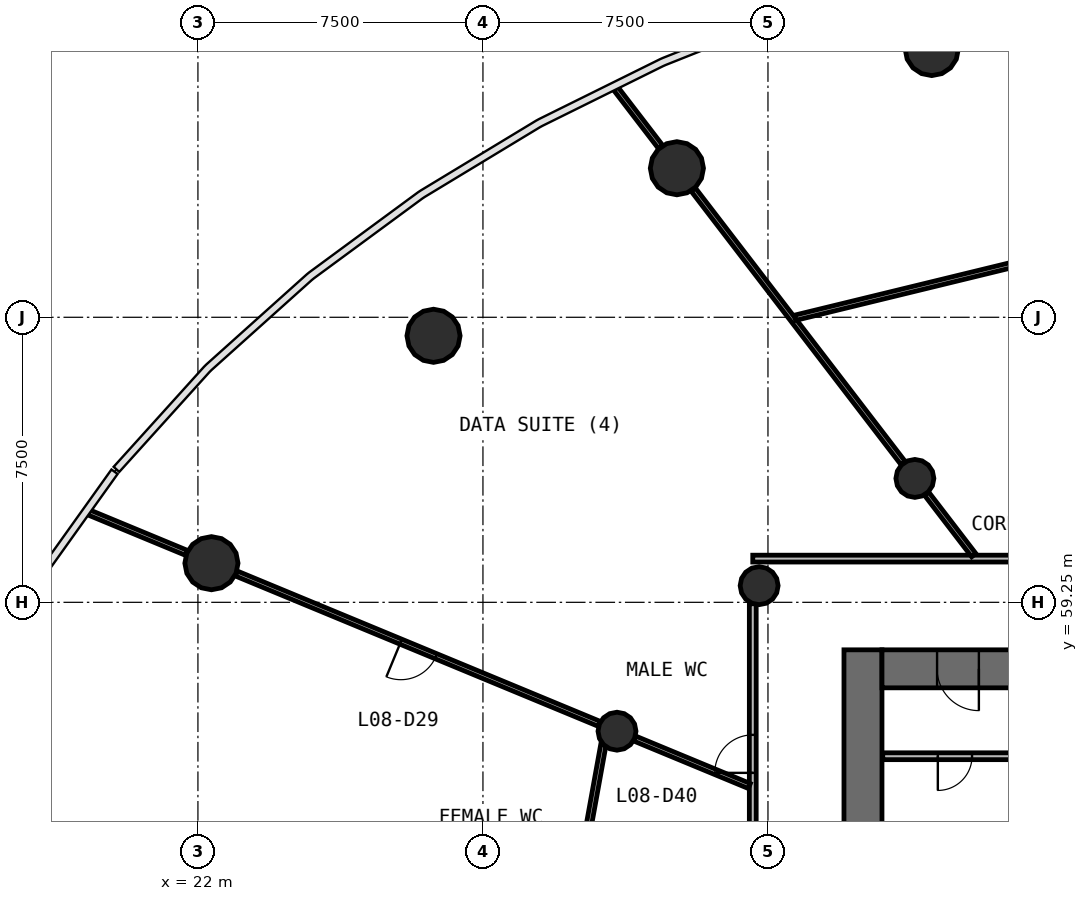
"""IFC4 building model, lengths in metres.
Left out: names, types, materials, properties, quantities, classifications, styles, units other than length and angle.
Written with IfcOpenShell. Run it as: python <this file> out.ifc"""

import sys

from ifc_helpers import new_model, si_unit, direction, frame, frame_2d, origin, origin_2d, place, context, subcontext, project, spatial, rectangle, circle, extrude, source, transform, mapped, element, fill, save


model = new_model("IFC4")
c1 = context("Model", 3, precision=1e-05, world=origin(), true_north=direction((0.0, 1.0)))
c2 = subcontext(c1, "Body", "Model", "MODEL_VIEW")
j1 = project(units=[si_unit("LENGTHUNIT", "METRE"), si_unit("PLANEANGLEUNIT", "RADIAN")], contexts=[c1])
p1 = place(None, origin())
s1 = spatial("IfcSite", under=j1, at=p1, CompositionType="ELEMENT")
p2 = place(p1, origin())
s2 = spatial("IfcBuilding", under=s1, at=p2, CompositionType="ELEMENT")
p3 = place(p2, frame((0.0, 0.0, 35.8)))
s3 = spatial("IfcBuildingStorey", under=s2, at=p3, CompositionType="ELEMENT", Elevation=35.8)
p4 = place(p3, frame((39.5, 58.0, 0.0), z_axis=(0.0, 0.0, 1.0), x_axis=(0.0, -1.0, 0.0)))
e1 = element("IfcWall", 1, at=p4, inside=s3, PredefinedType="SHEAR", context=c2, shape_type="SweptSolid", body=[
    extrude(rectangle(XDim=20.0, YDim=1.0, at=frame_2d((10.0, 0.0))), origin(), (0.0, 0.0, 1.0), 4.4),
])
p5 = place(p4, frame((9.1, 0.0, 0.0)))
e2 = element("IfcOpeningElement", 2, at=p5, cuts=e1, PredefinedType="OPENING", context=c2, shape_type="SweptSolid", body=[
    extrude(rectangle(XDim=1.8, YDim=2.1, at=frame_2d((0.9, 1.05))), frame((0.0, 0.51, 0.0), z_axis=(0.0, -1.0, 0.0), x_axis=(1.0, 0.0, 0.0)), (0.0, 0.0, 1.0), 1.02),
])
p6 = place(p3, frame((64.0, 57.5, 0.0), z_axis=(0.0, 0.0, 1.0), x_axis=(-1.0, 0.0, 0.0)))
e3 = element("IfcWall", 3, at=p6, inside=s3, PredefinedType="SHEAR", context=c2, shape_type="SweptSolid", body=[
    extrude(rectangle(XDim=24.0, YDim=1.0, at=frame_2d((12.0, 0.0))), origin(), (0.0, 0.0, 1.0), 4.4),
])
p7 = place(p6, frame((21.45, 0.0, 0.0)))
e4 = element("IfcOpeningElement", 4, at=p7, cuts=e3, PredefinedType="OPENING", context=c2, shape_type="SweptSolid", body=[
    extrude(rectangle(XDim=1.1, YDim=2.1, at=frame_2d((0.55, 1.05))), frame((0.0, 0.51, 0.0), z_axis=(0.0, -1.0, 0.0), x_axis=(1.0, 0.0, 0.0)), (0.0, 0.0, 1.0), 1.02),
])
p8 = place(p6, frame((1.95, 0.0, 0.0)))
e5 = element("IfcOpeningElement", 5, at=p8, cuts=e3, PredefinedType="OPENING", context=c2, shape_type="SweptSolid", body=[
    extrude(rectangle(XDim=1.1, YDim=2.1, at=frame_2d((0.55, 1.05))), frame((0.0, 0.51, 0.0), z_axis=(0.0, -1.0, 0.0), x_axis=(1.0, 0.0, 0.0)), (0.0, 0.0, 1.0), 1.02),
])
m1 = source(origin(), c2, "Body", "SweptSolid", [
    extrude(circle(Radius=0.7, at=origin_2d()), origin(), (0.0, 0.0, 1.0), 4.4),
])
for number, where, z_axis, x_axis in (
    (6, (41.31, 73.809, 0.0), (0.0, 0.0, 1.0), (1.0, 0.0, 0.0)),
    (7, (34.604, 70.672, 0.0), (0.0, 0.0, 1.0), (1.0, 0.0, 0.0)),
    (8, (28.199, 66.263, 0.0), (0.0, 0.0, 1.0), (1.0, 0.0, 0.0)),
    (9, (22.355, 60.279, 0.0), (0.0, 0.0, 1.0), (1.0, 0.0, 0.0)),
):
    element("IfcColumn", number, at=place(p3, frame(where, z_axis=z_axis, x_axis=x_axis)), inside=s3, PredefinedType="COLUMN", context=c2, shape_type="MappedRepresentation", body=[
        mapped(m1, transform((0.0, 0.0, 0.0), scale=1.0)),
    ])
m2 = source(origin(), c2, "Body", "SweptSolid", [
    extrude(circle(Radius=0.5, at=origin_2d()), origin(), (0.0, 0.0, 1.0), 4.4),
])
for number, where, z_axis, x_axis in (
    (10, (40.866, 62.51, 0.0), (0.0, 0.0, 1.0), (1.0, 0.0, 0.0)),
    (11, (36.768, 59.688, 0.0), (0.0, 0.0, 1.0), (1.0, 0.0, 0.0)),
    (12, (33.028, 55.859, 0.0), (0.0, 0.0, 1.0), (1.0, 0.0, 0.0)),
):
    element("IfcColumn", number, at=place(p3, frame(where, z_axis=z_axis, x_axis=x_axis)), inside=s3, PredefinedType="COLUMN", context=c2, shape_type="MappedRepresentation", body=[
        mapped(m2, transform((0.0, 0.0, 0.0), scale=1.0)),
    ])
p9 = place(p3, frame((36.6, 60.4, 0.0), z_axis=(0.0, 0.0, 1.0), x_axis=(1.0, 0.0, 0.0)))
e13 = element("IfcWall", 13, at=p9, inside=s3, PredefinedType="PARTITIONING", context=c2, shape_type="SweptSolid", body=[
    extrude(rectangle(XDim=30.8, YDim=0.18, at=frame_2d((15.4, 0.0))), origin(), (0.0, 0.0, 1.0), 3.05),
])
p10 = place(p9, frame((20.95, 0.0, 0.0)))
e14 = element("IfcOpeningElement", 14, at=p10, cuts=e13, PredefinedType="OPENING", context=c2, shape_type="SweptSolid", body=[
    extrude(rectangle(XDim=1.0, YDim=2.1, at=frame_2d((0.5, 1.05))), frame((0.0, 0.1, 0.0), z_axis=(0.0, -1.0, 0.0), x_axis=(1.0, 0.0, 0.0)), (0.0, 0.0, 1.0), 0.2),
])
p11 = place(p9, frame((14.95, 0.0, 0.0)))
e15 = element("IfcOpeningElement", 15, at=p11, cuts=e13, PredefinedType="OPENING", context=c2, shape_type="SweptSolid", body=[
    extrude(rectangle(XDim=1.0, YDim=2.1, at=frame_2d((0.5, 1.05))), frame((0.0, 0.1, 0.0), z_axis=(0.0, -1.0, 0.0), x_axis=(1.0, 0.0, 0.0)), (0.0, 0.0, 1.0), 0.2),
])
p12 = place(p3, frame((36.6, 35.63, 0.0), z_axis=(0.0, 0.0, 1.0), x_axis=(0.0, 1.0, 0.0)))
e16 = element("IfcWall", 16, at=p12, inside=s3, PredefinedType="PARTITIONING", context=c2, shape_type="SweptSolid", body=[
    extrude(rectangle(XDim=23.583, YDim=0.18, at=frame_2d((11.791, 0.0))), origin(), (0.0, 0.0, 1.0), 3.05),
])
p13 = place(p12, frame((16.032, 0.0, 0.0)))
e17 = element("IfcOpeningElement", 17, at=p13, cuts=e16, PredefinedType="OPENING", context=c2, shape_type="SweptSolid", body=[
    extrude(rectangle(XDim=0.9, YDim=2.1, at=frame_2d((0.45, 1.05))), frame((0.0, 0.1, 0.0), z_axis=(0.0, -1.0, 0.0), x_axis=(1.0, 0.0, 0.0)), (0.0, 0.0, 1.0), 0.2),
])
p14 = place(p12, frame((13.232, 0.0, 0.0)))
e18 = element("IfcOpeningElement", 18, at=p14, cuts=e16, PredefinedType="OPENING", context=c2, shape_type="SweptSolid", body=[
    extrude(rectangle(XDim=0.9, YDim=2.1, at=frame_2d((0.45, 1.05))), frame((0.0, 0.1, 0.0), z_axis=(0.0, -1.0, 0.0), x_axis=(1.0, 0.0, 0.0)), (0.0, 0.0, 1.0), 0.2),
])
p15 = place(p12, frame((11.433, 0.0, 0.0)))
e19 = element("IfcOpeningElement", 19, at=p15, cuts=e16, PredefinedType="OPENING", context=c2, shape_type="SweptSolid", body=[
    extrude(rectangle(XDim=0.9, YDim=2.1, at=frame_2d((0.45, 1.05))), frame((0.0, 0.1, 0.0), z_axis=(0.0, -1.0, 0.0), x_axis=(1.0, 0.0, 0.0)), (0.0, 0.0, 1.0), 0.2),
])
p16 = place(p12, frame((9.133, 0.0, 0.0)))
e20 = element("IfcOpeningElement", 20, at=p16, cuts=e16, PredefinedType="OPENING", context=c2, shape_type="SweptSolid", body=[
    extrude(rectangle(XDim=1.0, YDim=2.1, at=frame_2d((0.5, 1.05))), frame((0.0, 0.1, 0.0), z_axis=(0.0, -1.0, 0.0), x_axis=(1.0, 0.0, 0.0)), (0.0, 0.0, 1.0), 0.2),
])
p17 = place(p12, frame((19.133, 0.0, 0.0)))
e21 = element("IfcOpeningElement", 21, at=p17, cuts=e16, PredefinedType="OPENING", context=c2, shape_type="SweptSolid", body=[
    extrude(rectangle(XDim=1.0, YDim=2.1, at=frame_2d((0.5, 1.05))), frame((0.0, 0.1, 0.0), z_axis=(0.0, -1.0, 0.0), x_axis=(1.0, 0.0, 0.0)), (0.0, 0.0, 1.0), 0.2),
])
p18 = place(p3, frame((43.77, 55.2, 0.0), z_axis=(0.0, 0.0, 1.0), x_axis=(-1.0, 0.0, 0.0)))
e22 = element("IfcWall", 22, at=p18, inside=s3, PredefinedType="PARTITIONING", context=c2, shape_type="SweptSolid", body=[
    extrude(rectangle(XDim=3.75, YDim=0.18, at=frame_2d((1.875, 0.0))), origin(), (0.0, 0.0, 1.0), 3.95),
])
p19 = place(p18, frame((1.4, 0.0, 0.0)))
e23 = element("IfcOpeningElement", 23, at=p19, cuts=e22, PredefinedType="OPENING", context=c2, shape_type="SweptSolid", body=[
    extrude(rectangle(XDim=0.9, YDim=2.1, at=frame_2d((0.45, 1.05))), frame((0.0, 0.1, 0.0), z_axis=(0.0, -1.0, 0.0), x_axis=(1.0, 0.0, 0.0)), (0.0, 0.0, 1.0), 0.2),
])
p20 = place(p3, frame((32.561, 56.052, 0.0), z_axis=(0.0, 0.0, 1.0), x_axis=(-0.923874685699, 0.382695133396, 0.0)))
e24 = element("IfcWall", 24, at=p20, inside=s3, PredefinedType="PARTITIONING", context=c2, shape_type="SweptSolid", body=[
    extrude(rectangle(XDim=10.341, YDim=0.14, at=frame_2d((5.17, 0.0))), origin(), (0.0, 0.0, 1.0), 3.05),
])
p21 = place(p20, frame((4.65, 0.0, 0.0)))
e25 = element("IfcOpeningElement", 25, at=p21, cuts=e24, PredefinedType="OPENING", context=c2, shape_type="SweptSolid", body=[
    extrude(rectangle(XDim=1.0, YDim=2.1, at=frame_2d((0.5, 1.05))), frame((0.0, 0.08, 0.0), z_axis=(0.0, -1.0, 0.0), x_axis=(1.0, 0.0, 0.0)), (0.0, 0.0, 1.0), 0.16),
])
p22 = place(p3, frame((35.032, 70.113, 0.0), z_axis=(0.0, 0.0, 1.0), x_axis=(0.608770769454, -0.793346173028, 0.0)))
e26 = element("IfcWall", 26, at=p22, inside=s3, PredefinedType="PARTITIONING", context=c2, shape_type="SweptSolid", body=[
    extrude(rectangle(XDim=9.079, YDim=0.14, at=frame_2d((4.54, 0.0))), origin(), (0.0, 0.0, 1.0), 3.05),
])
p23 = place(p3, frame((43.641, 68.18, 0.0), z_axis=(0.0, 0.0, 1.0), x_axis=(-0.971620655009, -0.23654450482, 0.0)))
e27 = element("IfcWall", 27, at=p23, inside=s3, PredefinedType="PARTITIONING", context=c2, shape_type="SweptSolid", body=[
    extrude(rectangle(XDim=6.103, YDim=0.14, at=frame_2d((3.051, 0.0))), origin(), (0.0, 0.0, 1.0), 3.05),
])
p24 = place(p3, frame((32.669, 55.503, 0.0), z_axis=(0.0, 0.0, 1.0), x_axis=(-0.178046403734, -0.984022092291, 0.0)))
e28 = element("IfcWall", 28, at=p24, inside=s3, PredefinedType="PARTITIONING", context=c2, shape_type="SweptSolid", body=[
    extrude(rectangle(XDim=4.891, YDim=0.14, at=frame_2d((2.446, 0.0))), origin(), (0.0, 0.0, 1.0), 3.05),
])
p25 = place(p3, frame((36.51, 54.416, 0.0), z_axis=(0.0, 0.0, 1.0), x_axis=(-0.923911109142, 0.382607190737, 0.0)))
e29 = element("IfcWall", 29, at=p25, inside=s3, PredefinedType="PARTITIONING", context=c2, shape_type="SweptSolid", body=[
    extrude(rectangle(XDim=3.264, YDim=0.14, at=frame_2d((1.632, 0.0))), origin(), (0.0, 0.0, 1.0), 3.05),
])
p26 = place(p3, frame((21.704, 60.549, 0.0), z_axis=(0.0, 0.0, 1.0), x_axis=(-0.923906214347, 0.382619010363, 0.0)))
e30 = element("IfcWall", 30, at=p26, inside=s3, PredefinedType="PARTITIONING", context=c2, shape_type="SweptSolid", body=[
    extrude(rectangle(XDim=2.797, YDim=0.14, at=frame_2d((1.399, 0.0))), origin(), (0.0, 0.0, 1.0), 3.05),
])
p27 = place(p3, frame((42.416, 60.49, 0.0), z_axis=(0.0, 0.0, 1.0), x_axis=(-0.608727763541, 0.793379171578, 0.0)))
e31 = element("IfcWall", 31, at=p27, inside=s3, PredefinedType="PARTITIONING", context=c2, shape_type="SweptSolid", body=[
    extrude(rectangle(XDim=2.042, YDim=0.14, at=frame_2d((1.021, 0.0))), origin(), (0.0, 0.0, 1.0), 3.05),
])
p28 = place(p3, frame((34.175, 71.23, 0.0), z_axis=(0.0, 0.0, 1.0), x_axis=(-0.608846424219, 0.793288113938, 0.0)))
e32 = element("IfcWall", 32, at=p28, inside=s3, PredefinedType="PARTITIONING", context=c2, shape_type="SweptSolid", body=[
    extrude(rectangle(XDim=1.939, YDim=0.14, at=frame_2d((0.97, 0.0))), origin(), (0.0, 0.0, 1.0), 3.05),
])
m3 = source(origin(), c2, "Body", "SweptSolid", [
    extrude(rectangle(XDim=1.1, YDim=2.1, at=frame_2d((0.55, 1.05))), frame((0.0, 0.025, 0.0), z_axis=(0.0, -1.0, 0.0), x_axis=(1.0, 0.0, 0.0)), (0.0, 0.0, 1.0), 0.05),
])
p29 = place(p7, origin())
e33 = element("IfcDoor", 33, at=p29, inside=s3, OperationType="SINGLE_SWING_LEFT", PredefinedType="DOOR", context=c2, shape_type="MappedRepresentation", body=[
    mapped(m3, transform((0.0, 0.0, 0.0), scale=1.0)),
])
fill(e4, e33)
m4 = source(origin(), c2, "Body", "SweptSolid", [
    extrude(rectangle(XDim=1.0, YDim=2.1, at=frame_2d((0.5, 1.05))), frame((0.0, 0.025, 0.0), z_axis=(0.0, -1.0, 0.0), x_axis=(1.0, 0.0, 0.0)), (0.0, 0.0, 1.0), 0.05),
])
p30 = place(p21, origin())
e34 = element("IfcDoor", 34, at=p30, inside=s3, OperationType="SINGLE_SWING_RIGHT", PredefinedType="DOOR", context=c2, shape_type="MappedRepresentation", body=[
    mapped(m4, transform((0.0, 0.0, 0.0), scale=1.0)),
])
fill(e25, e34)
p31 = place(p17, origin())
e35 = element("IfcDoor", 35, at=p31, inside=s3, OperationType="SINGLE_SWING_LEFT", PredefinedType="DOOR", context=c2, shape_type="MappedRepresentation", body=[
    mapped(m4, transform((0.0, 0.0, 0.0), scale=1.0)),
])
fill(e21, e35)
m5 = source(origin(), c2, "Body", "SweptSolid", [
    extrude(rectangle(XDim=0.9, YDim=2.1, at=frame_2d((0.45, 1.05))), frame((0.0, 0.025, 0.0), z_axis=(0.0, -1.0, 0.0), x_axis=(1.0, 0.0, 0.0)), (0.0, 0.0, 1.0), 0.05),
])
p32 = place(p19, origin())
e36 = element("IfcDoor", 36, at=p32, inside=s3, OperationType="SINGLE_SWING_RIGHT", PredefinedType="DOOR", context=c2, shape_type="MappedRepresentation", body=[
    mapped(m5, transform((0.0, 0.0, 0.0), scale=1.0)),
])
fill(e23, e36)
save(model, sys.argv[1])
